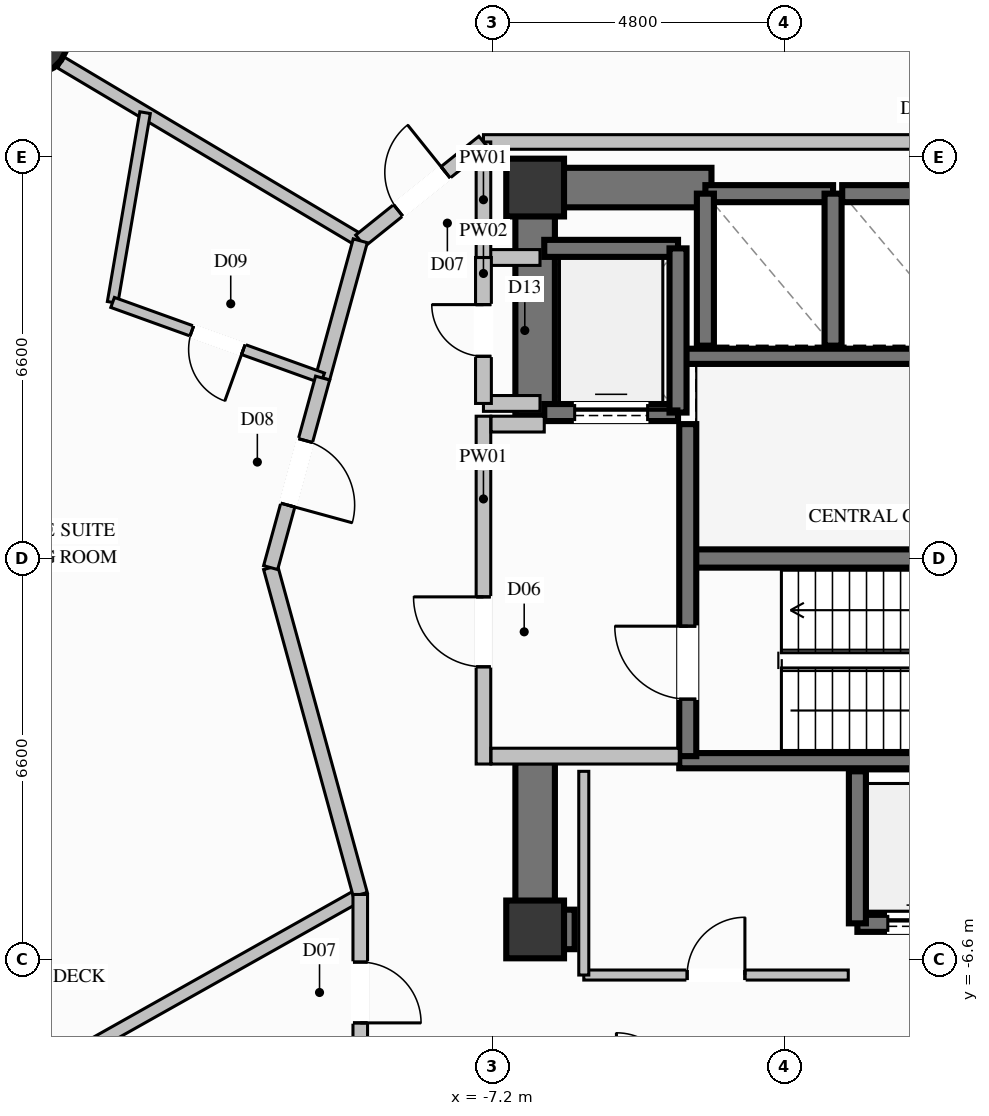
"""IFC4 building model, lengths in metres.
Left out: names, types, materials, properties, quantities, classifications, styles, units other than length and angle.
Written with IfcOpenShell. Run it as: python <this file> out.ifc"""

import sys

from ifc_helpers import new_model, si_unit, direction, frame, frame_2d, origin, origin_2d, place, context, subcontext, project, spatial, rectangle, circle, extrude, element, fill, save


model = new_model("IFC4")
c1 = context("Model", 3, precision=1e-05, world=origin(), true_north=direction((0.0, 1.0)))
c2 = subcontext(c1, "Body", "Model", "MODEL_VIEW")
j1 = project(units=[si_unit("LENGTHUNIT", "METRE"), si_unit("PLANEANGLEUNIT", "RADIAN")], contexts=[c1])
p1 = place(None, origin())
s1 = spatial("IfcSite", under=j1, at=p1, CompositionType="ELEMENT")
p2 = place(p1, origin())
s2 = spatial("IfcBuilding", under=s1, at=p2, CompositionType="ELEMENT")
p3 = place(p2, frame((0.0, 0.0, 142.2)))
s3 = spatial("IfcBuildingStorey", under=s2, at=p3, CompositionType="ELEMENT", Elevation=142.2)
for number, where, z_axis, x_axis in (
    (1, (-6.5, -6.1, 0.0), (0.0, 0.0, 1.0), (1.0, 0.0, 0.0)),
    (2, (-6.5, 6.1, 0.0), (0.0, 0.0, 1.0), (1.0, 0.0, 0.0)),
):
    element("IfcColumn", number, at=place(p3, frame(where, z_axis=z_axis, x_axis=x_axis)), inside=s3, PredefinedType="COLUMN", context=c2, shape_type="SweptSolid", body=[
        extrude(rectangle(XDim=0.95, YDim=0.95, at=origin_2d()), origin(), (0.0, 0.0, 1.0), 3.6),
    ])
p4 = place(p3, frame((-3.99, 0.0, 0.0), z_axis=(0.0, 0.0, 1.0), x_axis=(1.0, 0.0, 0.0)))
e3 = element("IfcWall", 3, at=p4, inside=s3, PredefinedType="SHEAR", context=c2, shape_type="SweptSolid", body=[
    extrude(rectangle(XDim=7.98, YDim=0.3, at=frame_2d((3.99, 0.0))), origin(), (0.0, 0.0, 1.0), 3.6),
])
for number, where, z_axis, x_axis in (
    (4, (-4.13, -3.325, 0.0), (0.0, 0.0, 1.0), (1.0, 0.0, 0.0)),
    (5, (-4.13, 3.325, 0.0), (0.0, 0.0, 1.0), (1.0, 0.0, 0.0)),
):
    element("IfcWall", number, at=place(p3, frame(where, z_axis=z_axis, x_axis=x_axis)), inside=s3, PredefinedType="SOLIDWALL", context=c2, shape_type="SweptSolid", body=[
        extrude(rectangle(XDim=8.26, YDim=0.25, at=frame_2d((4.13, 0.0))), origin(), (0.0, 0.0, 1.0), 3.6),
    ])
p5 = place(p3, frame((-6.175, -6.1, 0.0), z_axis=(0.0, 0.0, 1.0), x_axis=(1.0, 0.0, 0.0)))
e6 = element("IfcWall", 6, at=p5, inside=s3, PredefinedType="SHEAR", context=c2, shape_type="SweptSolid", body=[
    extrude(rectangle(XDim=0.325, YDim=0.65, at=frame_2d((0.163, 0.0))), origin(), (0.0, 0.0, 1.0), 3.6),
])
p6 = place(p3, frame((-6.175, 6.1, 0.0), z_axis=(0.0, 0.0, 1.0), x_axis=(1.0, 0.0, 0.0)))
e7 = element("IfcWall", 7, at=p6, inside=s3, PredefinedType="SHEAR", context=c2, shape_type="SweptSolid", body=[
    extrude(rectangle(XDim=2.575, YDim=0.65, at=frame_2d((1.288, 0.0))), origin(), (0.0, 0.0, 1.0), 3.6),
])
p7 = place(p3, frame((-6.5, 2.35, 0.0), z_axis=(0.0, 0.0, 1.0), x_axis=(0.0, 1.0, 0.0)))
e8 = element("IfcWall", 8, at=p7, inside=s3, PredefinedType="SHEAR", context=c2, shape_type="SweptSolid", body=[
    extrude(rectangle(XDim=4.075, YDim=0.65, at=frame_2d((2.038, 0.0))), origin(), (0.0, 0.0, 1.0), 3.6),
])
p8 = place(p3, frame((-6.5, -6.425, 0.0), z_axis=(0.0, 0.0, 1.0), x_axis=(0.0, 1.0, 0.0)))
e9 = element("IfcWall", 9, at=p8, inside=s3, PredefinedType="SHEAR", context=c2, shape_type="SweptSolid", body=[
    extrude(rectangle(XDim=3.075, YDim=0.65, at=frame_2d((1.538, 0.0))), origin(), (0.0, 0.0, 1.0), 3.6),
])
p9 = place(p3, frame((-14.722, 8.5, 0.0), z_axis=(0.0, 0.0, 1.0), x_axis=(1.0, 0.0, 0.0)))
e10 = element("IfcColumn", 10, at=p9, inside=s3, PredefinedType="COLUMN", context=c2, shape_type="SweptSolid", body=[
    extrude(circle(Radius=0.525, at=origin_2d()), origin(), (0.0, 0.0, 1.0), 3.6),
])
p10 = place(p3, frame((-1.2, -6.0, 0.0), z_axis=(0.0, 0.0, 1.0), x_axis=(1.0, 0.0, 0.0)))
e11 = element("IfcWall", 11, at=p10, inside=s3, PredefinedType="SOLIDWALL", context=c2, shape_type="SweptSolid", body=[
    extrude(rectangle(XDim=2.1, YDim=0.28, at=frame_2d((1.05, 0.0))), origin(), (0.0, 0.0, 1.0), 3.35),
])
p11 = place(p10, frame((0.5, 0.0, 0.0)))
e12 = element("IfcOpeningElement", 12, at=p11, cuts=e11, PredefinedType="OPENING", context=c2, shape_type="SweptSolid", body=[
    extrude(rectangle(XDim=1.1, YDim=2.2, at=frame_2d((0.55, 1.1))), frame((0.0, 0.15, 0.0), z_axis=(0.0, -1.0, 0.0), x_axis=(1.0, 0.0, 0.0)), (0.0, 0.0, 1.0), 0.3),
])
p12 = place(p3, frame((-1.2, -3.5, 0.0), z_axis=(0.0, 0.0, 1.0), x_axis=(0.0, -1.0, 0.0)))
e13 = element("IfcWall", 13, at=p12, inside=s3, PredefinedType="SOLIDWALL", context=c2, shape_type="SweptSolid", body=[
    extrude(rectangle(XDim=2.5, YDim=0.28, at=frame_2d((1.25, 0.0))), origin(), (0.0, 0.0, 1.0), 3.35),
])
p13 = place(p3, frame((-1.6, 6.0, 0.0), z_axis=(0.0, 0.0, 1.0), x_axis=(-1.0, 0.0, 0.0)))
e14 = element("IfcWall", 14, at=p13, inside=s3, PredefinedType="SOLIDWALL", context=c2, shape_type="SweptSolid", body=[
    extrude(rectangle(XDim=2.1, YDim=0.28, at=frame_2d((1.05, 0.0))), origin(), (0.0, 0.0, 1.0), 3.35),
])
for number, where, z_axis, x_axis in (
    (15, (-3.7, 6.0, 0.0), (0.0, 0.0, 1.0), (0.0, -1.0, 0.0)),
    (16, (-1.6, 3.5, 0.0), (0.0, 0.0, 1.0), (0.0, 1.0, 0.0)),
):
    element("IfcWall", number, at=place(p3, frame(where, z_axis=z_axis, x_axis=x_axis)), inside=s3, PredefinedType="SOLIDWALL", context=c2, shape_type="SweptSolid", body=[
        extrude(rectangle(XDim=2.5, YDim=0.28, at=frame_2d((1.25, 0.0))), origin(), (0.0, 0.0, 1.0), 3.35),
    ])
p14 = place(p3, frame((0.65, 6.0, 0.0), z_axis=(0.0, 0.0, 1.0), x_axis=(-1.0, 0.0, 0.0)))
e17 = element("IfcWall", 17, at=p14, inside=s3, PredefinedType="SOLIDWALL", context=c2, shape_type="SweptSolid", body=[
    extrude(rectangle(XDim=2.1, YDim=0.28, at=frame_2d((1.05, 0.0))), origin(), (0.0, 0.0, 1.0), 3.35),
])
p15 = place(p3, frame((-6.35, 2.4, 0.0), z_axis=(0.0, 0.0, 1.0), x_axis=(1.0, 0.0, 0.0)))
e18 = element("IfcWall", 18, at=p15, inside=s3, PredefinedType="SOLIDWALL", context=c2, shape_type="SweptSolid", body=[
    extrude(rectangle(XDim=2.2, YDim=0.28, at=frame_2d((1.1, 0.0))), origin(), (0.0, 0.0, 1.0), 3.35),
])
p16 = place(p15, frame((0.5, 0.0, 0.0)))
e19 = element("IfcOpeningElement", 19, at=p16, cuts=e18, PredefinedType="OPENING", context=c2, shape_type="SweptSolid", body=[
    extrude(rectangle(XDim=1.2, YDim=2.2, at=frame_2d((0.6, 1.1))), frame((0.0, 0.15, 0.0), z_axis=(0.0, -1.0, 0.0), x_axis=(1.0, 0.0, 0.0)), (0.0, 0.0, 1.0), 0.3),
])
p17 = place(p3, frame((-4.15, 5.1, 0.0), z_axis=(0.0, 0.0, 1.0), x_axis=(-1.0, 0.0, 0.0)))
e20 = element("IfcWall", 20, at=p17, inside=s3, PredefinedType="SOLIDWALL", context=c2, shape_type="SweptSolid", body=[
    extrude(rectangle(XDim=2.2, YDim=0.28, at=frame_2d((1.1, 0.0))), origin(), (0.0, 0.0, 1.0), 3.35),
])
p18 = place(p3, frame((-4.15, 2.4, 0.0), z_axis=(0.0, 0.0, 1.0), x_axis=(0.0, 1.0, 0.0)))
e21 = element("IfcWall", 21, at=p18, inside=s3, PredefinedType="SOLIDWALL", context=c2, shape_type="SweptSolid", body=[
    extrude(rectangle(XDim=2.7, YDim=0.28, at=frame_2d((1.35, 0.0))), origin(), (0.0, 0.0, 1.0), 3.35),
])
p19 = place(p3, frame((-3.99, -3.25, 0.0), z_axis=(0.0, 0.0, 1.0), x_axis=(0.0, 1.0, 0.0)))
e22 = element("IfcWall", 22, at=p19, inside=s3, PredefinedType="SOLIDWALL", context=c2, shape_type="SweptSolid", body=[
    extrude(rectangle(XDim=5.46, YDim=0.28, at=frame_2d((2.73, 0.0))), origin(), (0.0, 0.0, 1.0), 3.35),
])
p20 = place(p19, frame((0.937, 0.0, 0.0)))
e23 = element("IfcOpeningElement", 23, at=p20, cuts=e22, PredefinedType="OPENING", context=c2, shape_type="SweptSolid", body=[
    extrude(rectangle(XDim=1.2, YDim=2.2, at=frame_2d((0.6, 1.1))), frame((0.0, 0.15, 0.0), z_axis=(0.0, -1.0, 0.0), x_axis=(1.0, 0.0, 0.0)), (0.0, 0.0, 1.0), 0.3),
])
p21 = place(p3, frame((-7.35, -3.38, 0.0), z_axis=(0.0, 0.0, 1.0), x_axis=(0.0, 1.0, 0.0)))
e24 = element("IfcWall", 24, at=p21, inside=s3, PredefinedType="PARTITIONING", context=c2, shape_type="SweptSolid", body=[
    extrude(rectangle(XDim=5.72, YDim=0.24, at=frame_2d((2.86, 0.0))), origin(), (0.0, 0.0, 1.0), 2.435),
])
p22 = place(p21, frame((1.599, 0.0, 0.0)))
e25 = element("IfcOpeningElement", 25, at=p22, cuts=e24, PredefinedType="OPENING", context=c2, shape_type="SweptSolid", body=[
    extrude(rectangle(XDim=1.15, YDim=2.2, at=frame_2d((0.575, 1.1))), frame((0.0, 0.13, 0.0), z_axis=(0.0, -1.0, 0.0), x_axis=(1.0, 0.0, 0.0)), (0.0, 0.0, 1.0), 0.26),
])
p23 = place(p3, frame((-7.225, -3.25, 0.0), z_axis=(0.0, 0.0, 1.0), x_axis=(1.0, 0.0, 0.0)))
e26 = element("IfcWall", 26, at=p23, inside=s3, PredefinedType="PARTITIONING", context=c2, shape_type="SweptSolid", body=[
    extrude(rectangle(XDim=3.095, YDim=0.26, at=frame_2d((1.548, 0.0))), origin(), (0.0, 0.0, 1.0), 3.35),
])
p24 = place(p3, frame((-7.225, 2.21, 0.0), z_axis=(0.0, 0.0, 1.0), x_axis=(1.0, 0.0, 0.0)))
e27 = element("IfcWall", 27, at=p24, inside=s3, PredefinedType="PARTITIONING", context=c2, shape_type="SweptSolid", body=[
    extrude(rectangle(XDim=0.875, YDim=0.26, at=frame_2d((0.438, 0.0))), origin(), (0.0, 0.0, 1.0), 3.35),
])
for number, where, z_axis, x_axis in (
    (28, (-7.35, 4.95, 0.0), (0.0, 0.0, 1.0), (1.0, 0.0, 0.0)),
    (29, (-7.35, 2.55, 0.0), (0.0, 0.0, 1.0), (1.0, 0.0, 0.0)),
):
    element("IfcWall", number, at=place(p3, frame(where, z_axis=z_axis, x_axis=x_axis)), inside=s3, PredefinedType="PARTITIONING", context=c2, shape_type="SweptSolid", body=[
        extrude(rectangle(XDim=0.93, YDim=0.26, at=frame_2d((0.465, 0.0))), origin(), (0.0, 0.0, 1.0), 3.35),
    ])
p25 = place(p3, frame((-7.35, 2.55, 0.0), z_axis=(0.0, 0.0, 1.0), x_axis=(0.0, 1.0, 0.0)))
e30 = element("IfcWall", 30, at=p25, inside=s3, PredefinedType="PARTITIONING", context=c2, shape_type="SweptSolid", body=[
    extrude(rectangle(XDim=2.4, YDim=0.26, at=frame_2d((1.2, 0.0))), origin(), (0.0, 0.0, 1.0), 2.435),
])
p26 = place(p25, frame((0.775, 0.0, 0.0)))
e31 = element("IfcOpeningElement", 31, at=p26, cuts=e30, PredefinedType="OPENING", context=c2, shape_type="SweptSolid", body=[
    extrude(rectangle(XDim=0.85, YDim=2.05, at=frame_2d((0.425, 1.025))), frame((0.0, 0.14, 0.0), z_axis=(0.0, -1.0, 0.0), x_axis=(1.0, 0.0, 0.0)), (0.0, 0.0, 1.0), 0.28),
])
p27 = place(p3, frame((-7.35, 6.85, 0.0), z_axis=(0.0, 0.0, 1.0), x_axis=(1.0, 0.0, 0.0)))
e32 = element("IfcWall", 32, at=p27, inside=s3, PredefinedType="PARTITIONING", context=c2, shape_type="SweptSolid", body=[
    extrude(rectangle(XDim=14.7, YDim=0.24, at=frame_2d((7.35, 0.0))), origin(), (0.0, 0.0, 1.0), 2.435),
])
p28 = place(p3, frame((-7.35, 4.95, 0.0), z_axis=(0.0, 0.0, 1.0), x_axis=(0.0, 1.0, 0.0)))
e33 = element("IfcWall", 33, at=p28, inside=s3, PredefinedType="PARTITIONING", context=c2, shape_type="SweptSolid", body=[
    extrude(rectangle(XDim=1.9, YDim=0.24, at=frame_2d((0.95, 0.0))), origin(), (0.0, 0.0, 1.0), 2.435),
])
p29 = place(p3, frame((-5.7, -6.85, 0.0), z_axis=(0.0, 0.0, 1.0), x_axis=(1.0, 0.0, 0.0)))
e34 = element("IfcWall", 34, at=p29, inside=s3, PredefinedType="PARTITIONING", context=c2, shape_type="SweptSolid", body=[
    extrude(rectangle(XDim=4.35, YDim=0.165, at=frame_2d((2.175, 0.0))), origin(), (0.0, 0.0, 1.0), 2.435),
])
p30 = place(p29, frame((1.7, 0.0, 0.0)))
e35 = element("IfcOpeningElement", 35, at=p30, cuts=e34, PredefinedType="OPENING", context=c2, shape_type="SweptSolid", body=[
    extrude(rectangle(XDim=0.95, YDim=2.1, at=frame_2d((0.475, 1.05))), frame((0.0, 0.093, 0.0), z_axis=(0.0, -1.0, 0.0), x_axis=(1.0, 0.0, 0.0)), (0.0, 0.0, 1.0), 0.185),
])
p31 = place(p3, frame((-5.7, -3.5, 0.0), z_axis=(0.0, 0.0, 1.0), x_axis=(0.0, -1.0, 0.0)))
e36 = element("IfcWall", 36, at=p31, inside=s3, PredefinedType="PARTITIONING", context=c2, shape_type="SweptSolid", body=[
    extrude(rectangle(XDim=3.35, YDim=0.165, at=frame_2d((1.675, 0.0))), origin(), (0.0, 0.0, 1.0), 2.435),
])
p32 = place(p3, frame((-9.376, 5.225, 0.0), z_axis=(0.0, 0.0, 1.0), x_axis=(-0.859254979659, 0.511547534381, 0.0)))
e37 = element("IfcWall", 37, at=p32, inside=s3, PredefinedType="PARTITIONING", context=c2, shape_type="SweptSolid", body=[
    extrude(rectangle(XDim=5.729, YDim=0.21, at=frame_2d((2.865, 0.0))), origin(), (0.0, 0.0, 1.0), 2.718),
])
p33 = place(p3, frame((-9.376, -5.525, 0.0), z_axis=(0.0, 0.0, 1.0), x_axis=(-0.87160595107, -0.49020716647, 0.0)))
e38 = element("IfcWall", 38, at=p33, inside=s3, PredefinedType="PARTITIONING", context=c2, shape_type="SweptSolid", body=[
    extrude(rectangle(XDim=5.573, YDim=0.21, at=frame_2d((2.787, 0.0))), origin(), (0.0, 0.0, 1.0), 2.718),
])
p34 = place(p3, frame((-9.376, 5.225, 0.0), z_axis=(0.0, 0.0, 1.0), x_axis=(0.780061082582, 0.625703370169, 0.0)))
e39 = element("IfcWall", 39, at=p34, inside=s3, PredefinedType="PARTITIONING", context=c2, shape_type="SweptSolid", body=[
    extrude(rectangle(XDim=2.597, YDim=0.24, at=frame_2d((1.299, 0.0))), origin(), (0.0, 0.0, 1.0), 3.35),
])
p35 = place(p34, frame((0.799, 0.0, 0.0)))
e40 = element("IfcOpeningElement", 40, at=p35, cuts=e39, PredefinedType="OPENING", context=c2, shape_type="SweptSolid", body=[
    extrude(rectangle(XDim=1.0, YDim=2.2, at=frame_2d((0.5, 1.1))), frame((0.0, 0.13, 0.0), z_axis=(0.0, -1.0, 0.0), x_axis=(1.0, 0.0, 0.0)), (0.0, 0.0, 1.0), 0.26),
])
p36 = place(p3, frame((-9.376, 5.225, 0.0), z_axis=(0.0, 0.0, 1.0), x_axis=(-0.264431780812, -0.964404393031, 0.0)))
e41 = element("IfcWall", 41, at=p36, inside=s3, PredefinedType="PARTITIONING", context=c2, shape_type="SweptSolid", body=[
    extrude(rectangle(XDim=2.341, YDim=0.24, at=frame_2d((1.171, 0.0))), origin(), (0.0, 0.0, 1.0), 3.35),
])
p37 = place(p3, frame((-12.915, 7.332, 0.0), z_axis=(0.0, 0.0, 1.0), x_axis=(-0.168623538304, -0.985680527519, 0.0)))
e42 = element("IfcWall", 42, at=p37, inside=s3, PredefinedType="PLUMBINGWALL", context=c2, shape_type="SweptSolid", body=[
    extrude(rectangle(XDim=3.167, YDim=0.175, at=frame_2d((1.583, 0.0))), origin(), (0.0, 0.0, 1.0), 3.35),
])
p38 = place(p3, frame((-9.995, 2.967, 0.0), z_axis=(0.0, 0.0, 1.0), x_axis=(-0.940843318569, 0.338841924656, 0.0)))
e43 = element("IfcWall", 43, at=p38, inside=s3, PredefinedType="PLUMBINGWALL", context=c2, shape_type="SweptSolid", body=[
    extrude(rectangle(XDim=3.671, YDim=0.175, at=frame_2d((1.835, 0.0))), origin(), (0.0, 0.0, 1.0), 3.35),
])
p39 = place(p38, frame((1.386, 0.0, 0.0)))
e44 = element("IfcOpeningElement", 44, at=p39, cuts=e43, PredefinedType="OPENING", context=c2, shape_type="SweptSolid", body=[
    extrude(rectangle(XDim=0.9, YDim=2.1, at=frame_2d((0.45, 1.05))), frame((0.0, 0.098, 0.0), z_axis=(0.0, -1.0, 0.0), x_axis=(1.0, 0.0, 0.0)), (0.0, 0.0, 1.0), 0.195),
])
p40 = place(p3, frame((-10.85, -0.15, 0.0), z_axis=(0.0, 0.0, 1.0), x_axis=(0.264488542062, -0.964388827765, 0.0)))
e45 = element("IfcWall", 45, at=p40, inside=s3, PredefinedType="PARTITIONING", context=c2, shape_type="SweptSolid", body=[
    extrude(rectangle(XDim=5.573, YDim=0.24, at=frame_2d((2.787, 0.0))), origin(), (0.0, 0.0, 1.0), 3.35),
])
p41 = place(p3, frame((-9.995, 2.967, 0.0), z_axis=(0.0, 0.0, 1.0), x_axis=(-0.264529660797, -0.9643775498, 0.0)))
e46 = element("IfcWall", 46, at=p41, inside=s3, PredefinedType="PARTITIONING", context=c2, shape_type="SweptSolid", body=[
    extrude(rectangle(XDim=3.232, YDim=0.24, at=frame_2d((1.616, 0.0))), origin(), (0.0, 0.0, 1.0), 3.35),
])
p42 = place(p41, frame((1.066, 0.0, 0.0)))
e47 = element("IfcOpeningElement", 47, at=p42, cuts=e46, PredefinedType="OPENING", context=c2, shape_type="SweptSolid", body=[
    extrude(rectangle(XDim=1.1, YDim=2.3, at=frame_2d((0.55, 1.15))), frame((0.0, 0.13, 0.0), z_axis=(0.0, -1.0, 0.0), x_axis=(1.0, 0.0, 0.0)), (0.0, 0.0, 1.0), 0.26),
])
p43 = place(p3, frame((-9.376, -5.525, 0.0), z_axis=(0.0, 0.0, 1.0), x_axis=(0.0, -1.0, 0.0)))
e48 = element("IfcWall", 48, at=p43, inside=s3, PredefinedType="PARTITIONING", context=c2, shape_type="SweptSolid", body=[
    extrude(rectangle(XDim=3.225, YDim=0.24, at=frame_2d((1.613, 0.0))), origin(), (0.0, 0.0, 1.0), 3.35),
])
p44 = place(p43, frame((1.112, 0.0, 0.0)))
e49 = element("IfcOpeningElement", 49, at=p44, cuts=e48, PredefinedType="OPENING", context=c2, shape_type="SweptSolid", body=[
    extrude(rectangle(XDim=1.0, YDim=2.2, at=frame_2d((0.5, 1.1))), frame((0.0, 0.13, 0.0), z_axis=(0.0, -1.0, 0.0), x_axis=(1.0, 0.0, 0.0)), (0.0, 0.0, 1.0), 0.26),
])
p45 = place(p11, origin())
e50 = element("IfcDoor", 50, at=p45, inside=s3, OperationType="SLIDING_TO_LEFT", PredefinedType="DOOR", context=c2, shape_type="SweptSolid", body=[
    extrude(rectangle(XDim=1.1, YDim=2.2, at=frame_2d((0.55, 1.1))), frame((0.0, 0.025, 0.0), z_axis=(0.0, -1.0, 0.0), x_axis=(1.0, 0.0, 0.0)), (0.0, 0.0, 1.0), 0.05),
])
fill(e12, e50)
p46 = place(p16, origin())
e51 = element("IfcDoor", 51, at=p46, inside=s3, OperationType="SLIDING_TO_LEFT", PredefinedType="DOOR", context=c2, shape_type="SweptSolid", body=[
    extrude(rectangle(XDim=1.2, YDim=2.2, at=frame_2d((0.6, 1.1))), frame((0.0, 0.025, 0.0), z_axis=(0.0, -1.0, 0.0), x_axis=(1.0, 0.0, 0.0)), (0.0, 0.0, 1.0), 0.05),
])
fill(e19, e51)
p47 = place(p20, origin())
e52 = element("IfcDoor", 52, at=p47, inside=s3, OperationType="SINGLE_SWING_RIGHT", PredefinedType="DOOR", context=c2, shape_type="SweptSolid", body=[
    extrude(rectangle(XDim=1.2, YDim=2.2, at=frame_2d((0.6, 1.1))), frame((0.0, 0.025, 0.0), z_axis=(0.0, -1.0, 0.0), x_axis=(1.0, 0.0, 0.0)), (0.0, 0.0, 1.0), 0.05),
])
fill(e23, e52)
p48 = place(p22, origin())
e53 = element("IfcDoor", 53, at=p48, inside=s3, OperationType="SINGLE_SWING_RIGHT", PredefinedType="DOOR", context=c2, shape_type="SweptSolid", body=[
    extrude(rectangle(XDim=1.15, YDim=2.2, at=frame_2d((0.575, 1.1))), frame((0.0, 0.025, 0.0), z_axis=(0.0, -1.0, 0.0), x_axis=(1.0, 0.0, 0.0)), (0.0, 0.0, 1.0), 0.05),
])
fill(e25, e53)
p49 = place(p26, origin())
e54 = element("IfcDoor", 54, at=p49, inside=s3, OperationType="SINGLE_SWING_RIGHT", PredefinedType="DOOR", context=c2, shape_type="SweptSolid", body=[
    extrude(rectangle(XDim=0.85, YDim=2.05, at=frame_2d((0.425, 1.025))), frame((0.0, 0.025, 0.0), z_axis=(0.0, -1.0, 0.0), x_axis=(1.0, 0.0, 0.0)), (0.0, 0.0, 1.0), 0.05),
])
fill(e31, e54)
p50 = place(p30, origin())
e55 = element("IfcDoor", 55, at=p50, inside=s3, OperationType="SINGLE_SWING_RIGHT", PredefinedType="DOOR", context=c2, shape_type="SweptSolid", body=[
    extrude(rectangle(XDim=0.95, YDim=2.1, at=frame_2d((0.475, 1.05))), frame((0.0, 0.025, 0.0), z_axis=(0.0, -1.0, 0.0), x_axis=(1.0, 0.0, 0.0)), (0.0, 0.0, 1.0), 0.05),
])
fill(e35, e55)
p51 = place(p35, origin())
e56 = element("IfcDoor", 56, at=p51, inside=s3, OperationType="SINGLE_SWING_RIGHT", PredefinedType="DOOR", context=c2, shape_type="SweptSolid", body=[
    extrude(rectangle(XDim=1.0, YDim=2.2, at=frame_2d((0.5, 1.1))), frame((0.0, 0.025, 0.0), z_axis=(0.0, -1.0, 0.0), x_axis=(1.0, 0.0, 0.0)), (0.0, 0.0, 1.0), 0.05),
])
fill(e40, e56)
p52 = place(p39, origin())
e57 = element("IfcDoor", 57, at=p52, inside=s3, OperationType="SINGLE_SWING_LEFT", PredefinedType="DOOR", context=c2, shape_type="SweptSolid", body=[
    extrude(rectangle(XDim=0.9, YDim=2.1, at=frame_2d((0.45, 1.05))), frame((0.0, 0.025, 0.0), z_axis=(0.0, -1.0, 0.0), x_axis=(1.0, 0.0, 0.0)), (0.0, 0.0, 1.0), 0.05),
])
fill(e44, e57)
p53 = place(p42, origin())
e58 = element("IfcDoor", 58, at=p53, inside=s3, OperationType="SINGLE_SWING_RIGHT", PredefinedType="DOOR", context=c2, shape_type="SweptSolid", body=[
    extrude(rectangle(XDim=1.1, YDim=2.3, at=frame_2d((0.55, 1.15))), frame((0.0, 0.025, 0.0), z_axis=(0.0, -1.0, 0.0), x_axis=(1.0, 0.0, 0.0)), (0.0, 0.0, 1.0), 0.05),
])
fill(e47, e58)
p54 = place(p44, origin())
e59 = element("IfcDoor", 59, at=p54, inside=s3, OperationType="SINGLE_SWING_RIGHT", PredefinedType="DOOR", context=c2, shape_type="SweptSolid", body=[
    extrude(rectangle(XDim=1.0, YDim=2.2, at=frame_2d((0.5, 1.1))), frame((0.0, 0.025, 0.0), z_axis=(0.0, -1.0, 0.0), x_axis=(1.0, 0.0, 0.0)), (0.0, 0.0, 1.0), 0.05),
])
fill(e49, e59)
save(model, sys.argv[1])
